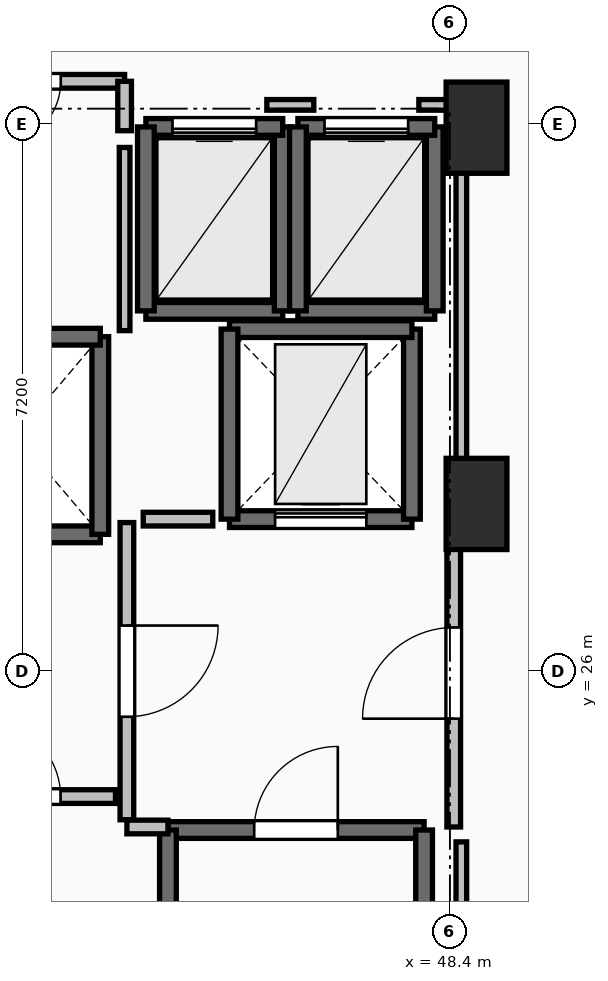
"""IFC4 building model, lengths in metres.
Left out: names, types, materials, properties, quantities, classifications, styles, units other than length and angle.
Written with IfcOpenShell. Run it as: python <this file> out.ifc"""

import sys

from ifc_helpers import new_model, si_unit, direction, frame, frame_2d, origin, origin_2d, place, context, subcontext, project, spatial, rectangle, extrude, element, fill, save


model = new_model("IFC4")
c1 = context("Model", 3, precision=1e-05, world=origin(), true_north=direction((0.0, 1.0)))
c2 = subcontext(c1, "Body", "Model", "MODEL_VIEW")
j1 = project(units=[si_unit("LENGTHUNIT", "METRE"), si_unit("PLANEANGLEUNIT", "RADIAN")], contexts=[c1])
p1 = place(None, origin())
s1 = spatial("IfcSite", under=j1, at=p1, CompositionType="ELEMENT")
p2 = place(p1, origin())
s2 = spatial("IfcBuilding", under=s1, at=p2, CompositionType="ELEMENT")
p3 = place(p2, frame((0.0, 0.0, 74.3)))
s3 = spatial("IfcBuildingStorey", under=s2, at=p3, CompositionType="ELEMENT", Elevation=74.3)
for number, where, z_axis, x_axis in (
    (1, (48.75, 33.15, 0.0), (0.0, 0.0, 1.0), (1.0, 0.0, 0.0)),
    (2, (48.75, 28.2, 0.0), (0.0, 0.0, 1.0), (1.0, 0.0, 0.0)),
):
    element("IfcColumn", number, at=place(p3, frame(where, z_axis=z_axis, x_axis=x_axis)), inside=s3, PredefinedType="PILASTER", context=c2, shape_type="SweptSolid", body=[
        extrude(rectangle(XDim=0.8, YDim=1.2, at=origin_2d()), origin(), (0.0, 0.0, 1.0), 4.5),
    ])
p4 = place(p3, frame((44.69, 23.91, 0.0), z_axis=(0.0, 0.0, 1.0), x_axis=(1.0, 0.0, 0.0)))
e3 = element("IfcWall", 3, at=p4, inside=s3, PredefinedType="SOLIDWALL", context=c2, shape_type="SweptSolid", body=[
    extrude(rectangle(XDim=3.37, YDim=0.22, at=frame_2d((1.685, 0.0))), origin(), (0.0, 0.0, 1.0), 4.24),
])
p5 = place(p4, frame((1.135, 0.0, 0.0)))
e4 = element("IfcOpeningElement", 4, at=p5, cuts=e3, PredefinedType="OPENING", context=c2, shape_type="SweptSolid", body=[
    extrude(rectangle(XDim=1.1, YDim=2.15, at=frame_2d((0.55, 1.075))), frame((0.0, 0.125, 0.0), z_axis=(0.0, -1.0, 0.0), x_axis=(1.0, 0.0, 0.0)), (0.0, 0.0, 1.0), 0.25),
])
for number, where, z_axis, x_axis in (
    (5, (48.06, 23.91, 0.0), (0.0, 0.0, 1.0), (0.0, -1.0, 0.0)),
    (6, (44.69, 16.49, 0.0), (0.0, 0.0, 1.0), (0.0, 1.0, 0.0)),
):
    element("IfcWall", number, at=place(p3, frame(where, z_axis=z_axis, x_axis=x_axis)), inside=s3, PredefinedType="SOLIDWALL", context=c2, shape_type="SweptSolid", body=[
        extrude(rectangle(XDim=7.42, YDim=0.22, at=frame_2d((3.71, 0.0))), origin(), (0.0, 0.0, 1.0), 4.24),
    ])
p6 = place(p3, frame((41.6, 27.8, 0.0), z_axis=(0.0, 0.0, 1.0), x_axis=(1.0, 0.0, 0.0)))
e7 = element("IfcWall", 7, at=p6, inside=s3, PredefinedType="SOLIDWALL", context=c2, shape_type="SweptSolid", body=[
    extrude(rectangle(XDim=2.2, YDim=0.22, at=frame_2d((1.1, 0.0))), origin(), (0.0, 0.0, 1.0), 4.24),
])
p7 = place(p3, frame((43.8, 27.8, 0.0), z_axis=(0.0, 0.0, 1.0), x_axis=(0.0, 1.0, 0.0)))
e8 = element("IfcWall", 8, at=p7, inside=s3, PredefinedType="SOLIDWALL", context=c2, shape_type="SweptSolid", body=[
    extrude(rectangle(XDim=2.6, YDim=0.22, at=frame_2d((1.3, 0.0))), origin(), (0.0, 0.0, 1.0), 4.24),
])
p8 = place(p3, frame((43.8, 30.4, 0.0), z_axis=(0.0, 0.0, 1.0), x_axis=(-1.0, 0.0, 0.0)))
e9 = element("IfcWall", 9, at=p8, inside=s3, PredefinedType="SOLIDWALL", context=c2, shape_type="SweptSolid", body=[
    extrude(rectangle(XDim=2.2, YDim=0.22, at=frame_2d((1.1, 0.0))), origin(), (0.0, 0.0, 1.0), 4.24),
])
p9 = place(p3, frame((44.4, 30.74, 0.0), z_axis=(0.0, 0.0, 1.0), x_axis=(1.0, 0.0, 0.0)))
e10 = element("IfcWall", 10, at=p9, inside=s3, PredefinedType="SOLIDWALL", context=c2, shape_type="SweptSolid", body=[
    extrude(rectangle(XDim=1.8, YDim=0.22, at=frame_2d((0.9, 0.0))), origin(), (0.0, 0.0, 1.0), 4.24),
])
p10 = place(p3, frame((46.2, 30.74, 0.0), z_axis=(0.0, 0.0, 1.0), x_axis=(0.0, 1.0, 0.0)))
e11 = element("IfcWall", 11, at=p10, inside=s3, PredefinedType="SOLIDWALL", context=c2, shape_type="SweptSolid", body=[
    extrude(rectangle(XDim=2.42, YDim=0.22, at=frame_2d((1.21, 0.0))), origin(), (0.0, 0.0, 1.0), 4.24),
])
p11 = place(p3, frame((46.2, 33.16, 0.0), z_axis=(0.0, 0.0, 1.0), x_axis=(-1.0, 0.0, 0.0)))
e12 = element("IfcWall", 12, at=p11, inside=s3, PredefinedType="SOLIDWALL", context=c2, shape_type="SweptSolid", body=[
    extrude(rectangle(XDim=1.8, YDim=0.22, at=frame_2d((0.9, 0.0))), origin(), (0.0, 0.0, 1.0), 4.24),
])
p12 = place(p11, frame((0.35, 0.0, 0.0)))
e13 = element("IfcOpeningElement", 13, at=p12, cuts=e12, PredefinedType="OPENING", context=c2, shape_type="SweptSolid", body=[
    extrude(rectangle(XDim=1.1, YDim=2.2, at=frame_2d((0.55, 1.1))), frame((0.0, 0.125, 0.0), z_axis=(0.0, -1.0, 0.0), x_axis=(1.0, 0.0, 0.0)), (0.0, 0.0, 1.0), 0.25),
])
p13 = place(p3, frame((44.4, 33.16, 0.0), z_axis=(0.0, 0.0, 1.0), x_axis=(0.0, -1.0, 0.0)))
e14 = element("IfcWall", 14, at=p13, inside=s3, PredefinedType="SOLIDWALL", context=c2, shape_type="SweptSolid", body=[
    extrude(rectangle(XDim=2.42, YDim=0.22, at=frame_2d((1.21, 0.0))), origin(), (0.0, 0.0, 1.0), 4.24),
])
p14 = place(p3, frame((46.4, 30.74, 0.0), z_axis=(0.0, 0.0, 1.0), x_axis=(1.0, 0.0, 0.0)))
e15 = element("IfcWall", 15, at=p14, inside=s3, PredefinedType="SOLIDWALL", context=c2, shape_type="SweptSolid", body=[
    extrude(rectangle(XDim=1.8, YDim=0.22, at=frame_2d((0.9, 0.0))), origin(), (0.0, 0.0, 1.0), 4.24),
])
p15 = place(p3, frame((48.2, 30.74, 0.0), z_axis=(0.0, 0.0, 1.0), x_axis=(0.0, 1.0, 0.0)))
e16 = element("IfcWall", 16, at=p15, inside=s3, PredefinedType="SOLIDWALL", context=c2, shape_type="SweptSolid", body=[
    extrude(rectangle(XDim=2.42, YDim=0.22, at=frame_2d((1.21, 0.0))), origin(), (0.0, 0.0, 1.0), 4.24),
])
p16 = place(p3, frame((48.2, 33.16, 0.0), z_axis=(0.0, 0.0, 1.0), x_axis=(-1.0, 0.0, 0.0)))
e17 = element("IfcWall", 17, at=p16, inside=s3, PredefinedType="SOLIDWALL", context=c2, shape_type="SweptSolid", body=[
    extrude(rectangle(XDim=1.8, YDim=0.22, at=frame_2d((0.9, 0.0))), origin(), (0.0, 0.0, 1.0), 4.24),
])
p17 = place(p16, frame((0.35, 0.0, 0.0)))
e18 = element("IfcOpeningElement", 18, at=p17, cuts=e17, PredefinedType="OPENING", context=c2, shape_type="SweptSolid", body=[
    extrude(rectangle(XDim=1.1, YDim=2.2, at=frame_2d((0.55, 1.1))), frame((0.0, 0.125, 0.0), z_axis=(0.0, -1.0, 0.0), x_axis=(1.0, 0.0, 0.0)), (0.0, 0.0, 1.0), 0.25),
])
p18 = place(p3, frame((46.4, 33.16, 0.0), z_axis=(0.0, 0.0, 1.0), x_axis=(0.0, -1.0, 0.0)))
e19 = element("IfcWall", 19, at=p18, inside=s3, PredefinedType="SOLIDWALL", context=c2, shape_type="SweptSolid", body=[
    extrude(rectangle(XDim=2.42, YDim=0.22, at=frame_2d((1.21, 0.0))), origin(), (0.0, 0.0, 1.0), 4.24),
])
p19 = place(p3, frame((45.5, 28.0, 0.0), z_axis=(0.0, 0.0, 1.0), x_axis=(1.0, 0.0, 0.0)))
e20 = element("IfcWall", 20, at=p19, inside=s3, PredefinedType="SHEAR", context=c2, shape_type="SweptSolid", body=[
    extrude(rectangle(XDim=2.4, YDim=0.22, at=frame_2d((1.2, 0.0))), origin(), (0.0, 0.0, 1.0), 4.24),
])
p20 = place(p19, frame((0.6, 0.0, 0.0)))
e21 = element("IfcOpeningElement", 21, at=p20, cuts=e20, PredefinedType="OPENING", context=c2, shape_type="SweptSolid", body=[
    extrude(rectangle(XDim=1.2, YDim=2.2, at=frame_2d((0.6, 1.1))), frame((0.0, 0.125, 0.0), z_axis=(0.0, -1.0, 0.0), x_axis=(1.0, 0.0, 0.0)), (0.0, 0.0, 1.0), 0.25),
])
p21 = place(p3, frame((47.9, 28.0, 0.0), z_axis=(0.0, 0.0, 1.0), x_axis=(0.0, 1.0, 0.0)))
e22 = element("IfcWall", 22, at=p21, inside=s3, PredefinedType="SHEAR", context=c2, shape_type="SweptSolid", body=[
    extrude(rectangle(XDim=2.5, YDim=0.22, at=frame_2d((1.25, 0.0))), origin(), (0.0, 0.0, 1.0), 4.24),
])
p22 = place(p3, frame((47.9, 30.5, 0.0), z_axis=(0.0, 0.0, 1.0), x_axis=(-1.0, 0.0, 0.0)))
e23 = element("IfcWall", 23, at=p22, inside=s3, PredefinedType="SHEAR", context=c2, shape_type="SweptSolid", body=[
    extrude(rectangle(XDim=2.4, YDim=0.22, at=frame_2d((1.2, 0.0))), origin(), (0.0, 0.0, 1.0), 4.24),
])
p23 = place(p3, frame((45.5, 30.5, 0.0), z_axis=(0.0, 0.0, 1.0), x_axis=(0.0, -1.0, 0.0)))
e24 = element("IfcWall", 24, at=p23, inside=s3, PredefinedType="SHEAR", context=c2, shape_type="SweptSolid", body=[
    extrude(rectangle(XDim=2.5, YDim=0.22, at=frame_2d((1.25, 0.0))), origin(), (0.0, 0.0, 1.0), 4.24),
])
p24 = place(p3, frame((44.15, 27.955, 0.0), z_axis=(0.0, 0.0, 1.0), x_axis=(0.0, -1.0, 0.0)))
e25 = element("IfcWall", 25, at=p24, inside=s3, PredefinedType="PARTITIONING", context=c2, shape_type="SweptSolid", body=[
    extrude(rectangle(XDim=3.91, YDim=0.18, at=frame_2d((1.955, 0.0))), origin(), (0.0, 0.0, 1.0), 4.24),
])
p25 = place(p24, frame((1.355, 0.0, 0.0)))
e26 = element("IfcOpeningElement", 26, at=p25, cuts=e25, PredefinedType="OPENING", context=c2, shape_type="SweptSolid", body=[
    extrude(rectangle(XDim=1.2, YDim=2.15, at=frame_2d((0.6, 1.075))), frame((0.0, 0.105, 0.0), z_axis=(0.0, -1.0, 0.0), x_axis=(1.0, 0.0, 0.0)), (0.0, 0.0, 1.0), 0.21),
])
p26 = place(p3, frame((44.15, 23.95, 0.0), z_axis=(0.0, 0.0, 1.0), x_axis=(1.0, 0.0, 0.0)))
e27 = element("IfcWall", 27, at=p26, inside=s3, PredefinedType="PARTITIONING", context=c2, shape_type="SweptSolid", body=[
    extrude(rectangle(XDim=0.54, YDim=0.18, at=frame_2d((0.27, 0.0))), origin(), (0.0, 0.0, 1.0), 4.24),
])
p27 = place(p3, frame((48.45, 23.95, 0.0), z_axis=(0.0, 0.0, 1.0), x_axis=(0.0, 1.0, 0.0)))
e28 = element("IfcWall", 28, at=p27, inside=s3, PredefinedType="PARTITIONING", context=c2, shape_type="SweptSolid", body=[
    extrude(rectangle(XDim=4.05, YDim=0.18, at=frame_2d((2.025, 0.0))), origin(), (0.0, 0.0, 1.0), 4.24),
])
p28 = place(p27, frame((1.425, 0.0, 0.0)))
e29 = element("IfcOpeningElement", 29, at=p28, cuts=e28, PredefinedType="OPENING", context=c2, shape_type="SweptSolid", body=[
    extrude(rectangle(XDim=1.2, YDim=2.15, at=frame_2d((0.6, 1.075))), frame((0.0, 0.105, 0.0), z_axis=(0.0, -1.0, 0.0), x_axis=(1.0, 0.0, 0.0)), (0.0, 0.0, 1.0), 0.21),
])
p29 = place(p3, frame((41.555, 24.35, 0.0), z_axis=(0.0, 0.0, 1.0), x_axis=(1.0, 0.0, 0.0)))
e30 = element("IfcWall", 30, at=p29, inside=s3, PredefinedType="PARTITIONING", context=c2, shape_type="SweptSolid", body=[
    extrude(rectangle(XDim=2.445, YDim=0.18, at=frame_2d((1.223, 0.0))), origin(), (0.0, 0.0, 1.0), 4.24),
])
p30 = place(p29, frame((0.722, 0.0, 0.0)))
e31 = element("IfcOpeningElement", 31, at=p30, cuts=e30, PredefinedType="OPENING", context=c2, shape_type="SweptSolid", body=[
    extrude(rectangle(XDim=1.0, YDim=2.15, at=frame_2d((0.5, 1.075))), frame((0.0, 0.105, 0.0), z_axis=(0.0, -1.0, 0.0), x_axis=(1.0, 0.0, 0.0)), (0.0, 0.0, 1.0), 0.21),
])
p31 = place(p3, frame((44.12, 33.76, 0.0), z_axis=(0.0, 0.0, 1.0), x_axis=(-1.0, 0.0, 0.0)))
e32 = element("IfcWall", 32, at=p31, inside=s3, PredefinedType="PARTITIONING", context=c2, shape_type="SweptSolid", body=[
    extrude(rectangle(XDim=2.53, YDim=0.18, at=frame_2d((1.265, 0.0))), origin(), (0.0, 0.0, 1.0), 4.24),
])
p32 = place(p31, frame((0.84, 0.0, 0.0)))
e33 = element("IfcOpeningElement", 33, at=p32, cuts=e32, PredefinedType="OPENING", context=c2, shape_type="SweptSolid", body=[
    extrude(rectangle(XDim=0.85, YDim=2.1, at=frame_2d((0.425, 1.05))), frame((0.0, 0.105, 0.0), z_axis=(0.0, -1.0, 0.0), x_axis=(1.0, 0.0, 0.0)), (0.0, 0.0, 1.0), 0.21),
])
p33 = place(p3, frame((44.12, 33.11, 0.0), z_axis=(0.0, 0.0, 1.0), x_axis=(0.0, 1.0, 0.0)))
e34 = element("IfcWall", 34, at=p33, inside=s3, PredefinedType="PARTITIONING", context=c2, shape_type="SweptSolid", body=[
    extrude(rectangle(XDim=0.65, YDim=0.18, at=frame_2d((0.325, 0.0))), origin(), (0.0, 0.0, 1.0), 4.24),
])
p34 = place(p3, frame((45.28, 28.0, 0.0), z_axis=(0.0, 0.0, 1.0), x_axis=(-1.0, 0.0, 0.0)))
e35 = element("IfcWall", 35, at=p34, inside=s3, PredefinedType="PARTITIONING", context=c2, shape_type="SweptSolid", body=[
    extrude(rectangle(XDim=0.915, YDim=0.18, at=frame_2d((0.458, 0.0))), origin(), (0.0, 0.0, 1.0), 4.24),
])
p35 = place(p3, frame((44.12, 30.48, 0.0), z_axis=(0.0, 0.0, 1.0), x_axis=(0.0, 1.0, 0.0)))
e36 = element("IfcWall", 36, at=p35, inside=s3, PredefinedType="PARTITIONING", context=c2, shape_type="SweptSolid", body=[
    extrude(rectangle(XDim=2.41, YDim=0.14, at=frame_2d((1.205, 0.0))), origin(), (0.0, 0.0, 1.0), 4.24),
])
p36 = place(p3, frame((45.991, 33.45, 0.0), z_axis=(0.0, 0.0, 1.0), x_axis=(1.0, 0.0, 0.0)))
e37 = element("IfcWall", 37, at=p36, inside=s3, PredefinedType="PARTITIONING", context=c2, shape_type="SweptSolid", body=[
    extrude(rectangle(XDim=0.618, YDim=0.14, at=frame_2d((0.309, 0.0))), origin(), (0.0, 0.0, 1.0), 4.24),
])
p37 = place(p3, frame((47.991, 33.45, 0.0), z_axis=(0.0, 0.0, 1.0), x_axis=(1.0, 0.0, 0.0)))
e38 = element("IfcWall", 38, at=p37, inside=s3, PredefinedType="PARTITIONING", context=c2, shape_type="SweptSolid", body=[
    extrude(rectangle(XDim=0.559, YDim=0.14, at=frame_2d((0.28, 0.0))), origin(), (0.0, 0.0, 1.0), 3.432),
])
p38 = place(p3, frame((48.55, 33.45, 0.0), z_axis=(0.0, 0.0, 1.0), x_axis=(0.0, -1.0, 0.0)))
e39 = element("IfcWall", 39, at=p38, inside=s3, PredefinedType="PARTITIONING", context=c2, shape_type="SweptSolid", body=[
    extrude(rectangle(XDim=5.254, YDim=0.14, at=frame_2d((2.627, 0.0))), origin(), (0.0, 0.0, 1.0), 3.432),
])
p39 = place(p3, frame((48.55, 23.754, 0.0), z_axis=(0.0, 0.0, 1.0), x_axis=(0.0, -1.0, 0.0)))
e40 = element("IfcWall", 40, at=p39, inside=s3, PredefinedType="PARTITIONING", context=c2, shape_type="SweptSolid", body=[
    extrude(rectangle(XDim=7.514, YDim=0.14, at=frame_2d((3.757, 0.0))), origin(), (0.0, 0.0, 1.0), 3.432),
])
p40 = place(p5, origin())
e41 = element("IfcDoor", 41, at=p40, inside=s3, OperationType="SINGLE_SWING_RIGHT", PredefinedType="DOOR", context=c2, shape_type="SweptSolid", body=[
    extrude(rectangle(XDim=1.1, YDim=2.15, at=frame_2d((0.55, 1.075))), frame((0.0, 0.025, 0.0), z_axis=(0.0, -1.0, 0.0), x_axis=(1.0, 0.0, 0.0)), (0.0, 0.0, 1.0), 0.05),
])
fill(e4, e41)
p41 = place(p12, origin())
e42 = element("IfcDoor", 42, at=p41, inside=s3, OperationType="SLIDING_TO_LEFT", PredefinedType="DOOR", context=c2, shape_type="SweptSolid", body=[
    extrude(rectangle(XDim=1.1, YDim=2.2, at=frame_2d((0.55, 1.1))), frame((0.0, 0.025, 0.0), z_axis=(0.0, -1.0, 0.0), x_axis=(1.0, 0.0, 0.0)), (0.0, 0.0, 1.0), 0.05),
])
fill(e13, e42)
p42 = place(p17, origin())
e43 = element("IfcDoor", 43, at=p42, inside=s3, OperationType="SLIDING_TO_LEFT", PredefinedType="DOOR", context=c2, shape_type="SweptSolid", body=[
    extrude(rectangle(XDim=1.1, YDim=2.2, at=frame_2d((0.55, 1.1))), frame((0.0, 0.025, 0.0), z_axis=(0.0, -1.0, 0.0), x_axis=(1.0, 0.0, 0.0)), (0.0, 0.0, 1.0), 0.05),
])
fill(e18, e43)
p43 = place(p20, origin())
e44 = element("IfcDoor", 44, at=p43, inside=s3, OperationType="SLIDING_TO_LEFT", PredefinedType="DOOR", context=c2, shape_type="SweptSolid", body=[
    extrude(rectangle(XDim=1.2, YDim=2.2, at=frame_2d((0.6, 1.1))), frame((0.0, 0.025, 0.0), z_axis=(0.0, -1.0, 0.0), x_axis=(1.0, 0.0, 0.0)), (0.0, 0.0, 1.0), 0.05),
])
fill(e21, e44)
p44 = place(p25, origin())
e45 = element("IfcDoor", 45, at=p44, inside=s3, OperationType="SINGLE_SWING_LEFT", PredefinedType="DOOR", context=c2, shape_type="SweptSolid", body=[
    extrude(rectangle(XDim=1.2, YDim=2.15, at=frame_2d((0.6, 1.075))), frame((0.0, 0.025, 0.0), z_axis=(0.0, -1.0, 0.0), x_axis=(1.0, 0.0, 0.0)), (0.0, 0.0, 1.0), 0.05),
])
fill(e26, e45)
p45 = place(p28, origin())
e46 = element("IfcDoor", 46, at=p45, inside=s3, OperationType="SINGLE_SWING_LEFT", PredefinedType="DOOR", context=c2, shape_type="SweptSolid", body=[
    extrude(rectangle(XDim=1.2, YDim=2.15, at=frame_2d((0.6, 1.075))), frame((0.0, 0.025, 0.0), z_axis=(0.0, -1.0, 0.0), x_axis=(1.0, 0.0, 0.0)), (0.0, 0.0, 1.0), 0.05),
])
fill(e29, e46)
p46 = place(p30, origin())
e47 = element("IfcDoor", 47, at=p46, inside=s3, OperationType="SINGLE_SWING_LEFT", PredefinedType="DOOR", context=c2, shape_type="SweptSolid", body=[
    extrude(rectangle(XDim=1.0, YDim=2.15, at=frame_2d((0.5, 1.075))), frame((0.0, 0.025, 0.0), z_axis=(0.0, -1.0, 0.0), x_axis=(1.0, 0.0, 0.0)), (0.0, 0.0, 1.0), 0.05),
])
fill(e31, e47)
p47 = place(p32, origin())
e48 = element("IfcDoor", 48, at=p47, inside=s3, OperationType="SINGLE_SWING_RIGHT", PredefinedType="DOOR", context=c2, shape_type="SweptSolid", body=[
    extrude(rectangle(XDim=0.85, YDim=2.1, at=frame_2d((0.425, 1.05))), frame((0.0, 0.025, 0.0), z_axis=(0.0, -1.0, 0.0), x_axis=(1.0, 0.0, 0.0)), (0.0, 0.0, 1.0), 0.05),
])
fill(e33, e48)
save(model, sys.argv[1])
